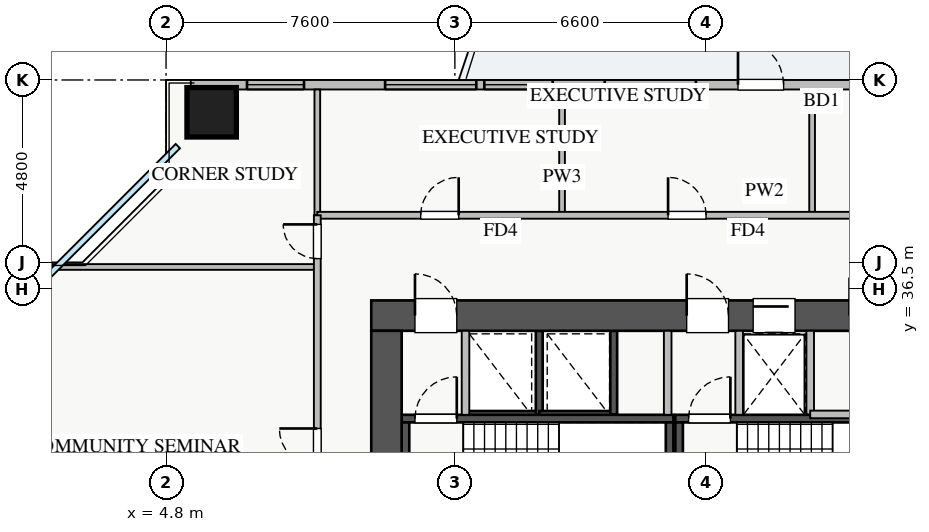
"""IFC4 building model, lengths in metres.
Left out: names, types, materials, properties, quantities, classifications, styles, units other than length and angle.
Written with IfcOpenShell. Run it as: python <this file> out.ifc"""

import sys

from ifc_helpers import new_model, si_unit, direction, frame, frame_2d, origin, origin_2d, place, context, subcontext, project, spatial, rectangle, extrude, source, transform, mapped, element, fill, save


model = new_model("IFC4")
c1 = context("Model", 3, precision=1e-05, world=origin(), true_north=direction((0.0, 1.0)))
c2 = subcontext(c1, "Body", "Model", "MODEL_VIEW")
j1 = project(units=[si_unit("LENGTHUNIT", "METRE"), si_unit("PLANEANGLEUNIT", "RADIAN")], contexts=[c1])
p1 = place(None, origin())
s1 = spatial("IfcSite", under=j1, at=p1, CompositionType="ELEMENT")
p2 = place(p1, origin())
s2 = spatial("IfcBuilding", under=s1, at=p2, CompositionType="ELEMENT")
p3 = place(p2, frame((0.0, 0.0, 76.25)))
s3 = spatial("IfcBuildingStorey", under=s2, at=p3, CompositionType="ELEMENT", Elevation=76.25)
p4 = place(p3, frame((12.68, 33.2, 0.0), z_axis=(0.0, 0.0, 1.0), x_axis=(1.0, 0.0, 0.0)))
e1 = element("IfcWall", 1, at=p4, inside=s3, PredefinedType="SHEAR", context=c2, shape_type="SweptSolid", body=[
    extrude(rectangle(XDim=1.94, YDim=0.18, at=frame_2d((0.97, 0.0))), origin(), (0.0, 0.0, 1.0), 3.07),
])
p5 = place(p3, frame((14.62, 33.2, 0.0), z_axis=(0.0, 0.0, 1.0), x_axis=(0.0, 1.0, 0.0)))
e2 = element("IfcWall", 2, at=p5, inside=s3, PredefinedType="SHEAR", context=c2, shape_type="SweptSolid", body=[
    extrude(rectangle(XDim=2.2, YDim=0.18, at=frame_2d((1.1, 0.0))), origin(), (0.0, 0.0, 1.0), 3.07),
])
p6 = place(p3, frame((14.62, 33.2, 0.0), z_axis=(0.0, 0.0, 1.0), x_axis=(1.0, 0.0, 0.0)))
e3 = element("IfcWall", 3, at=p6, inside=s3, PredefinedType="SHEAR", context=c2, shape_type="SweptSolid", body=[
    extrude(rectangle(XDim=1.96, YDim=0.18, at=frame_2d((0.98, 0.0))), origin(), (0.0, 0.0, 1.0), 3.07),
])
p7 = place(p3, frame((16.58, 33.2, 0.0), z_axis=(0.0, 0.0, 1.0), x_axis=(0.0, 1.0, 0.0)))
e4 = element("IfcWall", 4, at=p7, inside=s3, PredefinedType="SHEAR", context=c2, shape_type="SweptSolid", body=[
    extrude(rectangle(XDim=2.2, YDim=0.18, at=frame_2d((1.1, 0.0))), origin(), (0.0, 0.0, 1.0), 3.07),
])
p8 = place(p3, frame((19.88, 33.2, 0.0), z_axis=(0.0, 0.0, 1.0), x_axis=(1.0, 0.0, 0.0)))
e5 = element("IfcWall", 5, at=p8, inside=s3, PredefinedType="SHEAR", context=c2, shape_type="SweptSolid", body=[
    extrude(rectangle(XDim=1.87, YDim=0.18, at=frame_2d((0.935, 0.0))), origin(), (0.0, 0.0, 1.0), 3.07),
])
p9 = place(p3, frame((11.0, 33.09, 0.0), z_axis=(0.0, 0.0, 1.0), x_axis=(1.0, 0.0, 0.0)))
e6 = element("IfcWall", 6, at=p9, inside=s3, PredefinedType="SHEAR", context=c2, shape_type="SweptSolid", body=[
    extrude(rectangle(XDim=7.15, YDim=0.2, at=frame_2d((3.575, 0.0))), origin(), (0.0, 0.0, 1.0), 3.25),
])
p10 = place(p9, frame((0.35, 0.0, 0.0)))
e7 = element("IfcOpeningElement", 7, at=p10, cuts=e6, PredefinedType="OPENING", context=c2, shape_type="SweptSolid", body=[
    extrude(rectangle(XDim=1.1, YDim=2.05, at=frame_2d((0.55, 1.025))), frame((0.0, 0.11, 0.0), z_axis=(0.0, -1.0, 0.0), x_axis=(1.0, 0.0, 0.0)), (0.0, 0.0, 1.0), 0.22),
])
for number, where, z_axis, x_axis in (
    (8, (11.1, 30.05, 0.0), (0.0, 0.0, 1.0), (0.0, 1.0, 0.0)),
    (9, (18.05, 30.05, 0.0), (0.0, 0.0, 1.0), (0.0, 1.0, 0.0)),
):
    element("IfcWall", number, at=place(p3, frame(where, z_axis=z_axis, x_axis=x_axis)), inside=s3, PredefinedType="SHEAR", context=c2, shape_type="SweptSolid", body=[
        extrude(rectangle(XDim=2.94, YDim=0.2, at=frame_2d((1.47, 0.0))), origin(), (0.0, 0.0, 1.0), 3.25),
    ])
p11 = place(p3, frame((18.2, 33.09, 0.0), z_axis=(0.0, 0.0, 1.0), x_axis=(1.0, 0.0, 0.0)))
e10 = element("IfcWall", 10, at=p11, inside=s3, PredefinedType="SHEAR", context=c2, shape_type="SweptSolid", body=[
    extrude(rectangle(XDim=7.15, YDim=0.2, at=frame_2d((3.575, 0.0))), origin(), (0.0, 0.0, 1.0), 3.25),
])
p12 = place(p11, frame((0.35, 0.0, 0.0)))
e11 = element("IfcOpeningElement", 11, at=p12, cuts=e10, PredefinedType="OPENING", context=c2, shape_type="SweptSolid", body=[
    extrude(rectangle(XDim=1.1, YDim=2.05, at=frame_2d((0.55, 1.025))), frame((0.0, 0.11, 0.0), z_axis=(0.0, -1.0, 0.0), x_axis=(1.0, 0.0, 0.0)), (0.0, 0.0, 1.0), 0.22),
])
p13 = place(p3, frame((18.3, 30.05, 0.0), z_axis=(0.0, 0.0, 1.0), x_axis=(0.0, 1.0, 0.0)))
e12 = element("IfcWall", 12, at=p13, inside=s3, PredefinedType="SHEAR", context=c2, shape_type="SweptSolid", body=[
    extrude(rectangle(XDim=2.94, YDim=0.2, at=frame_2d((1.47, 0.0))), origin(), (0.0, 0.0, 1.0), 3.25),
])
p14 = place(p3, frame((10.2, 35.8, 0.0), z_axis=(0.0, 0.0, 1.0), x_axis=(1.0, 0.0, 0.0)))
e13 = element("IfcWall", 13, at=p14, inside=s3, PredefinedType="SHEAR", context=c2, shape_type="SweptSolid", body=[
    extrude(rectangle(XDim=17.6, YDim=0.8, at=frame_2d((8.8, 0.0))), origin(), (0.0, 0.0, 1.0), 3.25),
])
p15 = place(p14, frame((1.15, 0.0, 0.0)))
e14 = element("IfcOpeningElement", 14, at=p15, cuts=e13, PredefinedType="OPENING", context=c2, shape_type="SweptSolid", body=[
    extrude(rectangle(XDim=1.1, YDim=2.05, at=frame_2d((0.55, 1.025))), frame((0.0, 0.41, 0.0), z_axis=(0.0, -1.0, 0.0), x_axis=(1.0, 0.0, 0.0)), (0.0, 0.0, 1.0), 0.82),
])
p16 = place(p14, frame((8.3, 0.0, 0.0)))
e15 = element("IfcOpeningElement", 15, at=p16, cuts=e13, PredefinedType="OPENING", context=c2, shape_type="SweptSolid", body=[
    extrude(rectangle(XDim=1.1, YDim=2.05, at=frame_2d((0.55, 1.025))), frame((0.0, 0.41, 0.0), z_axis=(0.0, -1.0, 0.0), x_axis=(1.0, 0.0, 0.0)), (0.0, 0.0, 1.0), 0.82),
])
p17 = place(p14, frame((10.05, 0.0, 0.0)))
e16 = element("IfcOpeningElement", 16, at=p17, cuts=e13, PredefinedType="OPENING", context=c2, shape_type="SweptSolid", body=[
    extrude(rectangle(XDim=1.1, YDim=2.05, at=frame_2d((0.55, 1.025))), frame((0.0, 0.41, 0.0), z_axis=(0.0, -1.0, 0.0), x_axis=(1.0, 0.0, 0.0)), (0.0, 0.0, 1.0), 0.82),
])
p18 = place(p14, frame((14.74, 0.0, 0.0)))
e17 = element("IfcOpeningElement", 17, at=p18, cuts=e13, PredefinedType="OPENING", context=c2, shape_type="SweptSolid", body=[
    extrude(rectangle(XDim=1.0, YDim=2.05, at=frame_2d((0.5, 1.025))), frame((0.0, 0.41, 0.0), z_axis=(0.0, -1.0, 0.0), x_axis=(1.0, 0.0, 0.0)), (0.0, 0.0, 1.0), 0.82),
])
p19 = place(p14, frame((12.585, 0.0, 0.0)))
e18 = element("IfcOpeningElement", 18, at=p19, cuts=e13, PredefinedType="OPENING", context=c2, shape_type="SweptSolid", body=[
    extrude(rectangle(XDim=1.0, YDim=2.05, at=frame_2d((0.5, 1.025))), frame((0.0, 0.41, 0.0), z_axis=(0.0, -1.0, 0.0), x_axis=(1.0, 0.0, 0.0)), (0.0, 0.0, 1.0), 0.82),
])
p20 = place(p3, frame((10.6, 29.8, 0.0), z_axis=(0.0, 0.0, 1.0), x_axis=(0.0, 1.0, 0.0)))
e19 = element("IfcWall", 19, at=p20, inside=s3, PredefinedType="SHEAR", context=c2, shape_type="SweptSolid", body=[
    extrude(rectangle(XDim=5.6, YDim=0.8, at=frame_2d((2.8, 0.0))), origin(), (0.0, 0.0, 1.0), 3.25),
])
m1 = source(origin(), c2, "Body", "SweptSolid", [
    extrude(rectangle(XDim=1.3, YDim=1.3, at=origin_2d()), origin(), (0.0, 0.0, 1.0), 3.25),
])
p21 = place(p3, frame((6.0, 41.15, 0.0), z_axis=(0.0, 0.0, 1.0), x_axis=(1.0, 0.0, 0.0)))
e20 = element("IfcColumn", 20, at=p21, inside=s3, PredefinedType="COLUMN", context=c2, shape_type="MappedRepresentation", body=[
    mapped(m1, transform((0.0, 0.0, 0.0), x_axis=(1.0, 0.0, 0.0), y_axis=(0.0, 1.0, 0.0), z_axis=(0.0, 0.0, 1.0), scale=1.0)),
])
p22 = place(p3, frame((5.45, 41.875, 0.0), z_axis=(0.0, 0.0, 1.0), x_axis=(1.0, 0.0, 0.0)))
e21 = element("IfcWall", 21, at=p22, inside=s3, PredefinedType="STANDARD", context=c2, shape_type="SweptSolid", body=[
    extrude(rectangle(XDim=27.1, YDim=0.25, at=frame_2d((13.55, 0.0))), origin(), (0.0, 0.0, 1.0), 2.61),
])
p23 = place(p22, frame((14.4, 0.0, 0.0)))
e22 = element("IfcOpeningElement", 22, at=p23, cuts=e21, PredefinedType="OPENING", context=c2, shape_type="SweptSolid", body=[
    extrude(rectangle(XDim=1.2, YDim=2.1, at=frame_2d((0.6, 1.05))), frame((0.0, 0.135, 0.0), z_axis=(0.0, -1.0, 0.0), x_axis=(1.0, 0.0, 0.0)), (0.0, 0.0, 1.0), 0.27),
])
p24 = place(p22, frame((1.48, 0.0, 0.9)))
e23 = element("IfcOpeningElement", 23, at=p24, cuts=e21, PredefinedType="OPENING", context=c2, shape_type="SweptSolid", body=[
    extrude(rectangle(XDim=1.5, YDim=1.5, at=frame_2d((0.75, 0.75))), frame((0.0, 0.135, 0.0), z_axis=(0.0, -1.0, 0.0), x_axis=(1.0, 0.0, 0.0)), (0.0, 0.0, 1.0), 0.27),
])
p25 = place(p22, frame((7.725, 0.0, 0.9)))
e24 = element("IfcOpeningElement", 24, at=p25, cuts=e21, PredefinedType="OPENING", context=c2, shape_type="SweptSolid", body=[
    extrude(rectangle(XDim=1.8, YDim=1.5, at=frame_2d((0.9, 0.75))), frame((0.0, 0.135, 0.0), z_axis=(0.0, -1.0, 0.0), x_axis=(1.0, 0.0, 0.0)), (0.0, 0.0, 1.0), 0.27),
])
p26 = place(p22, frame((17.92, 0.0, 0.9)))
e25 = element("IfcOpeningElement", 25, at=p26, cuts=e21, PredefinedType="OPENING", context=c2, shape_type="SweptSolid", body=[
    extrude(rectangle(XDim=1.5, YDim=1.5, at=frame_2d((0.75, 0.75))), frame((0.0, 0.135, 0.0), z_axis=(0.0, -1.0, 0.0), x_axis=(1.0, 0.0, 0.0)), (0.0, 0.0, 1.0), 0.27),
])
p27 = place(p22, frame((22.663, 0.0, 0.9)))
e26 = element("IfcOpeningElement", 26, at=p27, cuts=e21, PredefinedType="OPENING", context=c2, shape_type="SweptSolid", body=[
    extrude(rectangle(XDim=2.1, YDim=1.48, at=frame_2d((1.05, 0.74))), frame((0.0, 0.135, 0.0), z_axis=(0.0, -1.0, 0.0), x_axis=(1.0, 0.0, 0.0)), (0.0, 0.0, 1.0), 0.27),
])
p28 = place(p22, frame((5.114, 0.0, 0.9)))
e27 = element("IfcOpeningElement", 27, at=p28, cuts=e21, PredefinedType="OPENING", context=c2, shape_type="SweptSolid", body=[
    extrude(rectangle(XDim=2.4, YDim=1.5, at=frame_2d((1.2, 0.75))), frame((0.0, 0.135, 0.0), z_axis=(0.0, -1.0, 0.0), x_axis=(1.0, 0.0, 0.0)), (0.0, 0.0, 1.0), 0.27),
])
p29 = place(p22, frame((10.893, 0.0, 0.9)))
e28 = element("IfcOpeningElement", 28, at=p29, cuts=e21, PredefinedType="OPENING", context=c2, shape_type="SweptSolid", body=[
    extrude(rectangle(XDim=2.4, YDim=1.5, at=frame_2d((1.2, 0.75))), frame((0.0, 0.135, 0.0), z_axis=(0.0, -1.0, 0.0), x_axis=(1.0, 0.0, 0.0)), (0.0, 0.0, 1.0), 0.27),
])
for number, where, z_axis, x_axis in (
    (29, (12.68, 33.19, 0.0), (0.0, 0.0, 1.0), (0.0, 1.0, 0.0)),
    (30, (18.0, 33.19, 0.0), (0.0, 0.0, 1.0), (0.0, 1.0, 0.0)),
    (31, (19.88, 33.19, 0.0), (0.0, 0.0, 1.0), (0.0, 1.0, 0.0)),
):
    element("IfcWall", number, at=place(p3, frame(where, z_axis=z_axis, x_axis=x_axis)), inside=s3, PredefinedType="PARTITIONING", context=c2, shape_type="SweptSolid", body=[
        extrude(rectangle(XDim=2.21, YDim=0.2, at=frame_2d((1.105, 0.0))), origin(), (0.0, 0.0, 1.0), 3.07),
    ])
p30 = place(p3, frame((21.75, 33.2, 0.0), z_axis=(0.0, 0.0, 1.0), x_axis=(0.0, 1.0, 0.0)))
e32 = element("IfcWall", 32, at=p30, inside=s3, PredefinedType="PARTITIONING", context=c2, shape_type="SweptSolid", body=[
    extrude(rectangle(XDim=2.2, YDim=0.2, at=frame_2d((1.1, 0.0))), origin(), (0.0, 0.0, 1.0), 3.07),
])
p31 = place(p3, frame((21.75, 33.2, 0.0), z_axis=(0.0, 0.0, 1.0), x_axis=(1.0, 0.0, 0.0)))
e33 = element("IfcWall", 33, at=p31, inside=s3, PredefinedType="PARTITIONING", context=c2, shape_type="SweptSolid", body=[
    extrude(rectangle(XDim=5.17, YDim=0.2, at=frame_2d((2.585, 0.0))), origin(), (0.0, 0.0, 1.0), 3.07),
])
for number, where, z_axis, x_axis in (
    (34, (15.22, 38.44, 0.0), (0.0, 0.0, 1.0), (0.0, 1.0, 0.0)),
    (35, (21.8, 38.44, 0.0), (0.0, 0.0, 1.0), (0.0, 1.0, 0.0)),
    (36, (8.78, 38.44, 0.0), (0.0, 0.0, 1.0), (0.0, 1.0, 0.0)),
):
    element("IfcWall", number, at=place(p3, frame(where, z_axis=z_axis, x_axis=x_axis)), inside=s3, PredefinedType="PARTITIONING", context=c2, shape_type="SweptSolid", body=[
        extrude(rectangle(XDim=3.31, YDim=0.15, at=frame_2d((1.655, 0.0))), origin(), (0.0, 0.0, 1.0), 3.07),
    ])
p32 = place(p3, frame((8.78, 38.44, 0.0), z_axis=(0.0, 0.0, 1.0), x_axis=(1.0, 0.0, 0.0)))
e37 = element("IfcWall", 37, at=p32, inside=s3, PredefinedType="PARTITIONING", context=c2, shape_type="SweptSolid", body=[
    extrude(rectangle(XDim=23.54, YDim=0.18, at=frame_2d((11.77, 0.0))), origin(), (0.0, 0.0, 1.0), 3.07),
])
p33 = place(p32, frame((2.72, 0.0, 0.0)))
e38 = element("IfcOpeningElement", 38, at=p33, cuts=e37, PredefinedType="OPENING", context=c2, shape_type="SweptSolid", body=[
    extrude(rectangle(XDim=1.0, YDim=2.05, at=frame_2d((0.5, 1.025))), frame((0.0, 0.1, 0.0), z_axis=(0.0, -1.0, 0.0), x_axis=(1.0, 0.0, 0.0)), (0.0, 0.0, 1.0), 0.2),
])
p34 = place(p32, frame((9.23, 0.0, 0.0)))
e39 = element("IfcOpeningElement", 39, at=p34, cuts=e37, PredefinedType="OPENING", context=c2, shape_type="SweptSolid", body=[
    extrude(rectangle(XDim=1.0, YDim=2.05, at=frame_2d((0.5, 1.025))), frame((0.0, 0.1, 0.0), z_axis=(0.0, -1.0, 0.0), x_axis=(1.0, 0.0, 0.0)), (0.0, 0.0, 1.0), 0.2),
])
p35 = place(p32, frame((14.84, 0.0, 0.0)))
e40 = element("IfcOpeningElement", 40, at=p35, cuts=e37, PredefinedType="OPENING", context=c2, shape_type="SweptSolid", body=[
    extrude(rectangle(XDim=1.0, YDim=2.05, at=frame_2d((0.5, 1.025))), frame((0.0, 0.1, 0.0), z_axis=(0.0, -1.0, 0.0), x_axis=(1.0, 0.0, 0.0)), (0.0, 0.0, 1.0), 0.2),
])
p36 = place(p32, frame((20.1, 0.0, 0.0)))
e41 = element("IfcOpeningElement", 41, at=p36, cuts=e37, PredefinedType="OPENING", context=c2, shape_type="SweptSolid", body=[
    extrude(rectangle(XDim=1.0, YDim=2.05, at=frame_2d((0.5, 1.025))), frame((0.0, 0.1, 0.0), z_axis=(0.0, -1.0, 0.0), x_axis=(1.0, 0.0, 0.0)), (0.0, 0.0, 1.0), 0.2),
])
p37 = place(p3, frame((0.25, 37.08, 0.0), z_axis=(0.0, 0.0, 1.0), x_axis=(1.0, 0.0, 0.0)))
e42 = element("IfcWall", 42, at=p37, inside=s3, PredefinedType="PARTITIONING", context=c2, shape_type="SweptSolid", body=[
    extrude(rectangle(XDim=8.53, YDim=0.15, at=frame_2d((4.265, 0.0))), origin(), (0.0, 0.0, 1.0), 3.07),
])
p38 = place(p3, frame((8.78, 7.21, 0.0), z_axis=(0.0, 0.0, 1.0), x_axis=(0.0, 1.0, 0.0)))
e43 = element("IfcWall", 43, at=p38, inside=s3, PredefinedType="PARTITIONING", context=c2, shape_type="SweptSolid", body=[
    extrude(rectangle(XDim=31.23, YDim=0.18, at=frame_2d((15.615, 0.0))), origin(), (0.0, 0.0, 1.0), 3.07),
])
p39 = place(p38, frame((30.09, 0.0, 0.0)))
e44 = element("IfcOpeningElement", 44, at=p39, cuts=e43, PredefinedType="OPENING", context=c2, shape_type="SweptSolid", body=[
    extrude(rectangle(XDim=0.9, YDim=2.05, at=frame_2d((0.45, 1.025))), frame((0.0, 0.1, 0.0), z_axis=(0.0, -1.0, 0.0), x_axis=(1.0, 0.0, 0.0)), (0.0, 0.0, 1.0), 0.2),
])
p40 = place(p38, frame((0.24, 0.0, 0.0)))
e45 = element("IfcOpeningElement", 45, at=p40, cuts=e43, PredefinedType="OPENING", context=c2, shape_type="SweptSolid", body=[
    extrude(rectangle(XDim=0.9, YDim=2.05, at=frame_2d((0.45, 1.025))), frame((0.0, 0.1, 0.0), z_axis=(0.0, -1.0, 0.0), x_axis=(1.0, 0.0, 0.0)), (0.0, 0.0, 1.0), 0.2),
])
p41 = place(p38, frame((2.84, 0.0, 0.0)))
e46 = element("IfcOpeningElement", 46, at=p41, cuts=e43, PredefinedType="OPENING", context=c2, shape_type="SweptSolid", body=[
    extrude(rectangle(XDim=1.0, YDim=2.05, at=frame_2d((0.5, 1.025))), frame((0.0, 0.1, 0.0), z_axis=(0.0, -1.0, 0.0), x_axis=(1.0, 0.0, 0.0)), (0.0, 0.0, 1.0), 0.2),
])
p42 = place(p38, frame((12.11, 0.0, 0.0)))
e47 = element("IfcOpeningElement", 47, at=p42, cuts=e43, PredefinedType="OPENING", context=c2, shape_type="SweptSolid", body=[
    extrude(rectangle(XDim=1.0, YDim=2.05, at=frame_2d((0.5, 1.025))), frame((0.0, 0.1, 0.0), z_axis=(0.0, -1.0, 0.0), x_axis=(1.0, 0.0, 0.0)), (0.0, 0.0, 1.0), 0.2),
])
p43 = place(p38, frame((24.62, 0.0, 0.0)))
e48 = element("IfcOpeningElement", 48, at=p43, cuts=e43, PredefinedType="OPENING", context=c2, shape_type="SweptSolid", body=[
    extrude(rectangle(XDim=1.0, YDim=2.05, at=frame_2d((0.5, 1.025))), frame((0.0, 0.1, 0.0), z_axis=(0.0, -1.0, 0.0), x_axis=(1.0, 0.0, 0.0)), (0.0, 0.0, 1.0), 0.2),
])
m2 = source(origin(), c2, "Body", "SweptSolid", [
    extrude(rectangle(XDim=1.2, YDim=2.1, at=frame_2d((0.6, 1.05))), frame((0.0, 0.025, 0.0), z_axis=(0.0, -1.0, 0.0), x_axis=(1.0, 0.0, 0.0)), (0.0, 0.0, 1.0), 0.05),
])
p44 = place(p23, origin())
e49 = element("IfcDoor", 49, at=p44, inside=s3, OperationType="SINGLE_SWING_LEFT", PredefinedType="DOOR", context=c2, shape_type="MappedRepresentation", body=[
    mapped(m2, transform((0.0, 0.0, 0.0), x_axis=(1.0, 0.0, 0.0), y_axis=(0.0, 1.0, 0.0), z_axis=(0.0, 0.0, 1.0), scale=1.0)),
])
fill(e22, e49)
m3 = source(origin(), c2, "Body", "SweptSolid", [
    extrude(rectangle(XDim=1.5, YDim=1.5, at=frame_2d((0.75, 0.75))), frame((0.0, 0.03, 0.0), z_axis=(0.0, -1.0, 0.0), x_axis=(1.0, 0.0, 0.0)), (0.0, 0.0, 1.0), 0.06),
])
p45 = place(p24, origin())
e50 = element("IfcWindow", 50, at=p45, inside=s3, PartitioningType="TRIPLE_PANEL_VERTICAL", PredefinedType="WINDOW", context=c2, shape_type="MappedRepresentation", body=[
    mapped(m3, transform((0.0, 0.0, 0.0), x_axis=(1.0, 0.0, 0.0), y_axis=(0.0, 1.0, 0.0), z_axis=(0.0, 0.0, 1.0), scale=1.0)),
])
fill(e23, e50)
m4 = source(origin(), c2, "Body", "SweptSolid", [
    extrude(rectangle(XDim=1.8, YDim=1.5, at=frame_2d((0.9, 0.75))), frame((0.0, 0.03, 0.0), z_axis=(0.0, -1.0, 0.0), x_axis=(1.0, 0.0, 0.0)), (0.0, 0.0, 1.0), 0.06),
])
p46 = place(p25, origin())
e51 = element("IfcWindow", 51, at=p46, inside=s3, PartitioningType="DOUBLE_PANEL_VERTICAL", PredefinedType="WINDOW", context=c2, shape_type="MappedRepresentation", body=[
    mapped(m4, transform((0.0, 0.0, 0.0), x_axis=(1.0, 0.0, 0.0), y_axis=(0.0, 1.0, 0.0), z_axis=(0.0, 0.0, 1.0), scale=1.0)),
])
fill(e24, e51)
m5 = source(origin(), c2, "Body", "SweptSolid", [
    extrude(rectangle(XDim=1.1, YDim=2.05, at=frame_2d((0.55, 1.025))), frame((0.0, 0.025, 0.0), z_axis=(0.0, -1.0, 0.0), x_axis=(1.0, 0.0, 0.0)), (0.0, 0.0, 1.0), 0.05),
])
p47 = place(p15, origin())
e52 = element("IfcDoor", 52, at=p47, inside=s3, OperationType="SINGLE_SWING_LEFT", PredefinedType="DOOR", context=c2, shape_type="MappedRepresentation", body=[
    mapped(m5, transform((0.0, 0.0, 0.0), x_axis=(1.0, 0.0, 0.0), y_axis=(0.0, 1.0, 0.0), z_axis=(0.0, 0.0, 1.0), scale=1.0)),
])
fill(e14, e52)
p48 = place(p10, origin())
e53 = element("IfcDoor", 53, at=p48, inside=s3, OperationType="SINGLE_SWING_RIGHT", PredefinedType="DOOR", context=c2, shape_type="MappedRepresentation", body=[
    mapped(m5, transform((0.0, 0.0, 0.0), x_axis=(1.0, 0.0, 0.0), y_axis=(0.0, 1.0, 0.0), z_axis=(0.0, 0.0, 1.0), scale=1.0)),
])
fill(e7, e53)
p49 = place(p16, origin())
e54 = element("IfcDoor", 54, at=p49, inside=s3, OperationType="SINGLE_SWING_LEFT", PredefinedType="DOOR", context=c2, shape_type="MappedRepresentation", body=[
    mapped(m5, transform((0.0, 0.0, 0.0), x_axis=(1.0, 0.0, 0.0), y_axis=(0.0, 1.0, 0.0), z_axis=(0.0, 0.0, 1.0), scale=1.0)),
])
fill(e15, e54)
p50 = place(p12, origin())
e55 = element("IfcDoor", 55, at=p50, inside=s3, OperationType="SINGLE_SWING_RIGHT", PredefinedType="DOOR", context=c2, shape_type="MappedRepresentation", body=[
    mapped(m5, transform((0.0, 0.0, 0.0), x_axis=(1.0, 0.0, 0.0), y_axis=(0.0, 1.0, 0.0), z_axis=(0.0, 0.0, 1.0), scale=1.0)),
])
fill(e11, e55)
p51 = place(p17, origin())
e56 = element("IfcDoor", 56, at=p51, inside=s3, OperationType="SLIDING_TO_LEFT", PredefinedType="DOOR", context=c2, shape_type="MappedRepresentation", body=[
    mapped(m5, transform((0.0, 0.0, 0.0), x_axis=(1.0, 0.0, 0.0), y_axis=(0.0, 1.0, 0.0), z_axis=(0.0, 0.0, 1.0), scale=1.0)),
])
fill(e16, e56)
m6 = source(origin(), c2, "Body", "SweptSolid", [
    extrude(rectangle(XDim=1.0, YDim=2.05, at=frame_2d((0.5, 1.025))), frame((0.0, 0.025, 0.0), z_axis=(0.0, -1.0, 0.0), x_axis=(1.0, 0.0, 0.0)), (0.0, 0.0, 1.0), 0.05),
])
p52 = place(p33, origin())
e57 = element("IfcDoor", 57, at=p52, inside=s3, OperationType="SINGLE_SWING_RIGHT", PredefinedType="DOOR", context=c2, shape_type="MappedRepresentation", body=[
    mapped(m6, transform((0.0, 0.0, 0.0), x_axis=(1.0, 0.0, 0.0), y_axis=(0.0, 1.0, 0.0), z_axis=(0.0, 0.0, 1.0), scale=1.0)),
])
fill(e38, e57)
p53 = place(p34, origin())
e58 = element("IfcDoor", 58, at=p53, inside=s3, OperationType="SINGLE_SWING_LEFT", PredefinedType="DOOR", context=c2, shape_type="MappedRepresentation", body=[
    mapped(m6, transform((0.0, 0.0, 0.0), x_axis=(1.0, 0.0, 0.0), y_axis=(0.0, 1.0, 0.0), z_axis=(0.0, 0.0, 1.0), scale=1.0)),
])
fill(e39, e58)
m7 = source(origin(), c2, "Body", "SweptSolid", [
    extrude(rectangle(XDim=0.9, YDim=2.05, at=frame_2d((0.45, 1.025))), frame((0.0, 0.025, 0.0), z_axis=(0.0, -1.0, 0.0), x_axis=(1.0, 0.0, 0.0)), (0.0, 0.0, 1.0), 0.05),
])
p54 = place(p39, origin())
e59 = element("IfcDoor", 59, at=p54, inside=s3, OperationType="SINGLE_SWING_RIGHT", PredefinedType="DOOR", context=c2, shape_type="MappedRepresentation", body=[
    mapped(m7, transform((0.0, 0.0, 0.0), x_axis=(1.0, 0.0, 0.0), y_axis=(0.0, 1.0, 0.0), z_axis=(0.0, 0.0, 1.0), scale=1.0)),
])
fill(e44, e59)
p55 = place(p43, origin())
e60 = element("IfcDoor", 60, at=p55, inside=s3, OperationType="SINGLE_SWING_RIGHT", PredefinedType="DOOR", context=c2, shape_type="MappedRepresentation", body=[
    mapped(m6, transform((0.0, 0.0, 0.0), x_axis=(1.0, 0.0, 0.0), y_axis=(0.0, 1.0, 0.0), z_axis=(0.0, 0.0, 1.0), scale=1.0)),
])
fill(e48, e60)
m8 = source(origin(), c2, "Body", "SweptSolid", [
    extrude(rectangle(XDim=2.4, YDim=1.5, at=frame_2d((1.2, 0.75))), frame((0.0, 0.03, 0.0), z_axis=(0.0, -1.0, 0.0), x_axis=(1.0, 0.0, 0.0)), (0.0, 0.0, 1.0), 0.06),
])
p56 = place(p28, origin())
e61 = element("IfcWindow", 61, at=p56, inside=s3, PartitioningType="TRIPLE_PANEL_VERTICAL", PredefinedType="WINDOW", context=c2, shape_type="MappedRepresentation", body=[
    mapped(m8, transform((0.0, 0.0, 0.0), x_axis=(1.0, 0.0, 0.0), y_axis=(0.0, 1.0, 0.0), z_axis=(0.0, 0.0, 1.0), scale=1.0)),
])
fill(e27, e61)
p57 = place(p29, origin())
e62 = element("IfcWindow", 62, at=p57, inside=s3, PartitioningType="TRIPLE_PANEL_VERTICAL", PredefinedType="WINDOW", context=c2, shape_type="MappedRepresentation", body=[
    mapped(m8, transform((0.0, 0.0, 0.0), x_axis=(1.0, 0.0, 0.0), y_axis=(0.0, 1.0, 0.0), z_axis=(0.0, 0.0, 1.0), scale=1.0)),
])
fill(e28, e62)
save(model, sys.argv[1])
